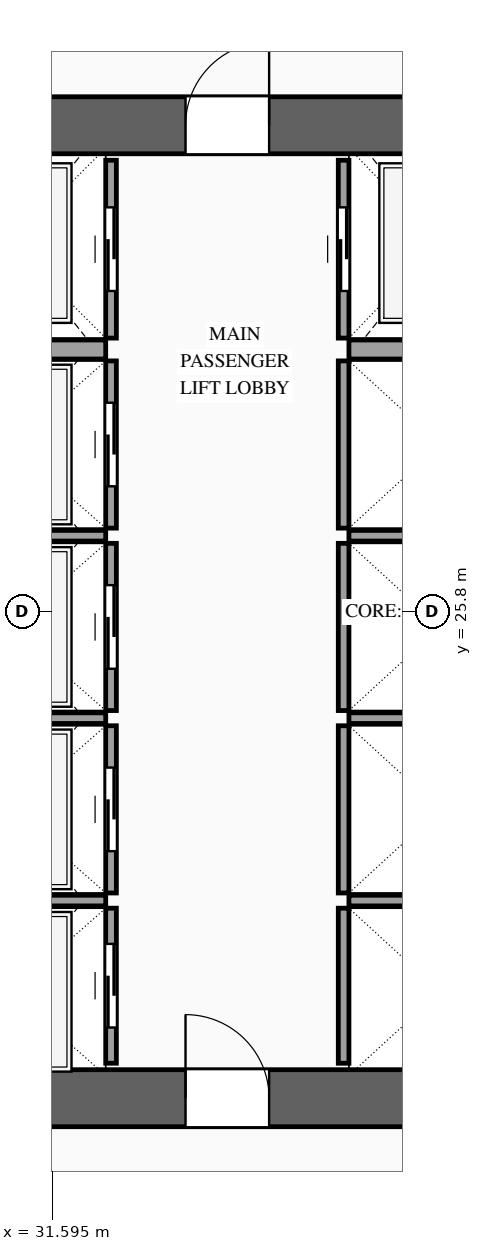
"""IFC4 building model, lengths in metres.
Left out: names, types, materials, properties, quantities, classifications, styles, units other than length and angle.
Written with IfcOpenShell. Run it as: python <this file> out.ifc"""

import sys

from ifc_helpers import new_model, si_unit, direction, frame, frame_2d, origin, place, context, subcontext, project, spatial, rectangle, extrude, source, transform, mapped, element, fill, save


model = new_model("IFC4")
c1 = context("Model", 3, precision=1e-05, world=origin(), true_north=direction((0.0, 1.0)))
c2 = subcontext(c1, "Body", "Model", "MODEL_VIEW")
j1 = project(units=[si_unit("LENGTHUNIT", "METRE"), si_unit("PLANEANGLEUNIT", "RADIAN")], contexts=[c1])
p1 = place(None, origin())
s1 = spatial("IfcSite", under=j1, at=p1, CompositionType="ELEMENT")
p2 = place(p1, origin())
s2 = spatial("IfcBuilding", under=s1, at=p2, CompositionType="ELEMENT")
p3 = place(p2, frame((0.0, 0.0, 138.0)))
s3 = spatial("IfcBuildingStorey", under=s2, at=p3, CompositionType="ELEMENT", Elevation=138.0)
p4 = place(p3, frame((23.425, 19.4, 0.0), z_axis=(0.0, 0.0, 1.0), x_axis=(1.0, 0.0, 0.0)))
e1 = element("IfcWall", 1, at=p4, inside=s3, PredefinedType="SHEAR", context=c2, shape_type="SweptSolid", body=[
    extrude(rectangle(XDim=27.15, YDim=0.75, at=frame_2d((13.575, 0.0))), origin(), (0.0, 0.0, 1.0), 3.6),
])
p5 = place(p4, frame((2.025, 0.0, 0.0)))
e2 = element("IfcOpeningElement", 2, at=p5, cuts=e1, PredefinedType="OPENING", context=c2, shape_type="SweptSolid", body=[
    extrude(rectangle(XDim=1.1, YDim=2.2, at=frame_2d((0.55, 1.1))), frame((0.0, 0.39, 0.0), z_axis=(0.0, -1.0, 0.0), x_axis=(1.0, 0.0, 0.0)), (0.0, 0.0, 1.0), 0.78),
])
p6 = place(p4, frame((9.925, 0.0, 0.0)))
e3 = element("IfcOpeningElement", 3, at=p6, cuts=e1, PredefinedType="OPENING", context=c2, shape_type="SweptSolid", body=[
    extrude(rectangle(XDim=1.1, YDim=2.2, at=frame_2d((0.55, 1.1))), frame((0.0, 0.39, 0.0), z_axis=(0.0, -1.0, 0.0), x_axis=(1.0, 0.0, 0.0)), (0.0, 0.0, 1.0), 0.78),
])
p7 = place(p4, frame((23.125, 0.0, 0.0)))
e4 = element("IfcOpeningElement", 4, at=p7, cuts=e1, PredefinedType="OPENING", context=c2, shape_type="SweptSolid", body=[
    extrude(rectangle(XDim=1.1, YDim=2.2, at=frame_2d((0.55, 1.1))), frame((0.0, 0.39, 0.0), z_axis=(0.0, -1.0, 0.0), x_axis=(1.0, 0.0, 0.0)), (0.0, 0.0, 1.0), 0.78),
])
p8 = place(p4, frame((19.745, 0.0, 0.0)))
e5 = element("IfcOpeningElement", 5, at=p8, cuts=e1, PredefinedType="OPENING", context=c2, shape_type="SweptSolid", body=[
    extrude(rectangle(XDim=0.9, YDim=2.15, at=frame_2d((0.45, 1.075))), frame((0.0, 0.39, 0.0), z_axis=(0.0, -1.0, 0.0), x_axis=(1.0, 0.0, 0.0)), (0.0, 0.0, 1.0), 0.78),
])
p9 = place(p4, frame((18.305, 0.0, 0.0)))
e6 = element("IfcOpeningElement", 6, at=p9, cuts=e1, PredefinedType="OPENING", context=c2, shape_type="SweptSolid", body=[
    extrude(rectangle(XDim=0.9, YDim=2.15, at=frame_2d((0.45, 1.075))), frame((0.0, 0.39, 0.0), z_axis=(0.0, -1.0, 0.0), x_axis=(1.0, 0.0, 0.0)), (0.0, 0.0, 1.0), 0.78),
])
p10 = place(p3, frame((23.425, 32.2, 0.0), z_axis=(0.0, 0.0, 1.0), x_axis=(1.0, 0.0, 0.0)))
e7 = element("IfcWall", 7, at=p10, inside=s3, PredefinedType="SHEAR", context=c2, shape_type="SweptSolid", body=[
    extrude(rectangle(XDim=27.15, YDim=0.75, at=frame_2d((13.575, 0.0))), origin(), (0.0, 0.0, 1.0), 3.6),
])
p11 = place(p10, frame((4.645, 0.0, 0.0)))
e8 = element("IfcOpeningElement", 8, at=p11, cuts=e7, PredefinedType="OPENING", context=c2, shape_type="SweptSolid", body=[
    extrude(rectangle(XDim=0.9, YDim=2.15, at=frame_2d((0.45, 1.075))), frame((0.0, 0.39, 0.0), z_axis=(0.0, -1.0, 0.0), x_axis=(1.0, 0.0, 0.0)), (0.0, 0.0, 1.0), 0.78),
])
p12 = place(p10, frame((9.925, 0.0, 0.0)))
e9 = element("IfcOpeningElement", 9, at=p12, cuts=e7, PredefinedType="OPENING", context=c2, shape_type="SweptSolid", body=[
    extrude(rectangle(XDim=1.1, YDim=2.2, at=frame_2d((0.55, 1.1))), frame((0.0, 0.39, 0.0), z_axis=(0.0, -1.0, 0.0), x_axis=(1.0, 0.0, 0.0)), (0.0, 0.0, 1.0), 0.78),
])
p13 = place(p10, frame((15.775, 0.0, 0.0)))
e10 = element("IfcOpeningElement", 10, at=p13, cuts=e7, PredefinedType="OPENING", context=c2, shape_type="SweptSolid", body=[
    extrude(rectangle(XDim=1.1, YDim=2.2, at=frame_2d((0.55, 1.1))), frame((0.0, 0.39, 0.0), z_axis=(0.0, -1.0, 0.0), x_axis=(1.0, 0.0, 0.0)), (0.0, 0.0, 1.0), 0.78),
])
p14 = place(p10, frame((18.975, 0.0, 0.0)))
e11 = element("IfcOpeningElement", 11, at=p14, cuts=e7, PredefinedType="OPENING", context=c2, shape_type="SweptSolid", body=[
    extrude(rectangle(XDim=0.9, YDim=2.15, at=frame_2d((0.45, 1.075))), frame((0.0, 0.39, 0.0), z_axis=(0.0, -1.0, 0.0), x_axis=(1.0, 0.0, 0.0)), (0.0, 0.0, 1.0), 0.78),
])
p15 = place(p3, frame((32.37, 19.86, 0.0), z_axis=(0.0, 0.0, 1.0), x_axis=(0.0, 1.0, 0.0)))
e12 = element("IfcWall", 12, at=p15, inside=s3, PredefinedType="SOLIDWALL", context=c2, shape_type="SweptSolid", body=[
    extrude(rectangle(XDim=2.04, YDim=0.14, at=frame_2d((1.02, 0.0))), origin(), (0.0, 0.0, 1.0), 3.38),
])
p16 = place(p15, frame((0.47, 0.0, 0.0)))
e13 = element("IfcOpeningElement", 13, at=p16, cuts=e12, PredefinedType="OPENING", context=c2, shape_type="SweptSolid", body=[
    extrude(rectangle(XDim=1.1, YDim=2.2, at=frame_2d((0.55, 1.1))), frame((0.0, 0.085, 0.0), z_axis=(0.0, -1.0, 0.0), x_axis=(1.0, 0.0, 0.0)), (0.0, 0.0, 1.0), 0.17),
])
m1 = source(origin(), c2, "Body", "SweptSolid", [
    extrude(rectangle(XDim=2.5, YDim=0.14, at=frame_2d((1.25, 0.0))), origin(), (0.0, 0.0, 1.0), 3.38),
])
p17 = place(p3, frame((29.8, 22.0, 0.0), z_axis=(0.0, 0.0, 1.0), x_axis=(1.0, 0.0, 0.0)))
e14 = element("IfcWall", 14, at=p17, inside=s3, PredefinedType="SOLIDWALL", context=c2, shape_type="MappedRepresentation", body=[
    mapped(m1, transform((0.0, 0.0, 0.0), scale=1.0)),
])
p18 = place(p3, frame((32.37, 22.1, 0.0), z_axis=(0.0, 0.0, 1.0), x_axis=(0.0, 1.0, 0.0)))
e15 = element("IfcWall", 15, at=p18, inside=s3, PredefinedType="SOLIDWALL", context=c2, shape_type="SweptSolid", body=[
    extrude(rectangle(XDim=2.2, YDim=0.14, at=frame_2d((1.1, 0.0))), origin(), (0.0, 0.0, 1.0), 3.38),
])
p19 = place(p18, frame((0.55, 0.0, 0.0)))
e16 = element("IfcOpeningElement", 16, at=p19, cuts=e15, PredefinedType="OPENING", context=c2, shape_type="SweptSolid", body=[
    extrude(rectangle(XDim=1.1, YDim=2.2, at=frame_2d((0.55, 1.1))), frame((0.0, 0.085, 0.0), z_axis=(0.0, -1.0, 0.0), x_axis=(1.0, 0.0, 0.0)), (0.0, 0.0, 1.0), 0.17),
])
p20 = place(p3, frame((29.8, 24.4, 0.0), z_axis=(0.0, 0.0, 1.0), x_axis=(1.0, 0.0, 0.0)))
e17 = element("IfcWall", 17, at=p20, inside=s3, PredefinedType="SOLIDWALL", context=c2, shape_type="MappedRepresentation", body=[
    mapped(m1, transform((0.0, 0.0, 0.0), scale=1.0)),
])
p21 = place(p3, frame((32.37, 24.5, 0.0), z_axis=(0.0, 0.0, 1.0), x_axis=(0.0, 1.0, 0.0)))
e18 = element("IfcWall", 18, at=p21, inside=s3, PredefinedType="SOLIDWALL", context=c2, shape_type="SweptSolid", body=[
    extrude(rectangle(XDim=2.2, YDim=0.14, at=frame_2d((1.1, 0.0))), origin(), (0.0, 0.0, 1.0), 3.38),
])
p22 = place(p21, frame((0.55, 0.0, 0.0)))
e19 = element("IfcOpeningElement", 19, at=p22, cuts=e18, PredefinedType="OPENING", context=c2, shape_type="SweptSolid", body=[
    extrude(rectangle(XDim=1.1, YDim=2.2, at=frame_2d((0.55, 1.1))), frame((0.0, 0.085, 0.0), z_axis=(0.0, -1.0, 0.0), x_axis=(1.0, 0.0, 0.0)), (0.0, 0.0, 1.0), 0.17),
])
p23 = place(p3, frame((29.8, 26.8, 0.0), z_axis=(0.0, 0.0, 1.0), x_axis=(1.0, 0.0, 0.0)))
e20 = element("IfcWall", 20, at=p23, inside=s3, PredefinedType="SOLIDWALL", context=c2, shape_type="MappedRepresentation", body=[
    mapped(m1, transform((0.0, 0.0, 0.0), scale=1.0)),
])
p24 = place(p3, frame((32.37, 26.9, 0.0), z_axis=(0.0, 0.0, 1.0), x_axis=(0.0, 1.0, 0.0)))
e21 = element("IfcWall", 21, at=p24, inside=s3, PredefinedType="SOLIDWALL", context=c2, shape_type="SweptSolid", body=[
    extrude(rectangle(XDim=2.2, YDim=0.14, at=frame_2d((1.1, 0.0))), origin(), (0.0, 0.0, 1.0), 3.38),
])
p25 = place(p24, frame((0.55, 0.0, 0.0)))
e22 = element("IfcOpeningElement", 22, at=p25, cuts=e21, PredefinedType="OPENING", context=c2, shape_type="SweptSolid", body=[
    extrude(rectangle(XDim=1.1, YDim=2.2, at=frame_2d((0.55, 1.1))), frame((0.0, 0.085, 0.0), z_axis=(0.0, -1.0, 0.0), x_axis=(1.0, 0.0, 0.0)), (0.0, 0.0, 1.0), 0.17),
])
p26 = place(p3, frame((32.37, 29.4, 0.0), z_axis=(0.0, 0.0, 1.0), x_axis=(0.0, 1.0, 0.0)))
e23 = element("IfcWall", 23, at=p26, inside=s3, PredefinedType="SOLIDWALL", context=c2, shape_type="SweptSolid", body=[
    extrude(rectangle(XDim=2.34, YDim=0.14, at=frame_2d((1.17, 0.0))), origin(), (0.0, 0.0, 1.0), 3.38),
])
p27 = place(p26, frame((0.62, 0.0, 0.0)))
e24 = element("IfcOpeningElement", 24, at=p27, cuts=e23, PredefinedType="OPENING", context=c2, shape_type="SweptSolid", body=[
    extrude(rectangle(XDim=1.1, YDim=2.2, at=frame_2d((0.55, 1.1))), frame((0.0, 0.085, 0.0), z_axis=(0.0, -1.0, 0.0), x_axis=(1.0, 0.0, 0.0)), (0.0, 0.0, 1.0), 0.17),
])
m2 = source(origin(), c2, "Body", "SweptSolid", [
    extrude(rectangle(XDim=2.5, YDim=0.25, at=frame_2d((1.25, 0.0))), origin(), (0.0, 0.0, 1.0), 3.38),
])
p28 = place(p3, frame((29.8, 29.25, 0.0), z_axis=(0.0, 0.0, 1.0), x_axis=(1.0, 0.0, 0.0)))
e25 = element("IfcWall", 25, at=p28, inside=s3, PredefinedType="SOLIDWALL", context=c2, shape_type="MappedRepresentation", body=[
    mapped(m2, transform((0.0, 0.0, 0.0), scale=1.0)),
])
m3 = source(origin(), c2, "Body", "SweptSolid", [
    extrude(rectangle(XDim=2.04, YDim=0.14, at=frame_2d((1.02, 0.0))), origin(), (0.0, 0.0, 1.0), 3.38),
])
p29 = place(p3, frame((35.43, 19.86, 0.0), z_axis=(0.0, 0.0, 1.0), x_axis=(0.0, 1.0, 0.0)))
e26 = element("IfcWall", 26, at=p29, inside=s3, PredefinedType="SOLIDWALL", context=c2, shape_type="MappedRepresentation", body=[
    mapped(m3, transform((0.0, 0.0, 0.0), scale=1.0)),
])
m4 = source(origin(), c2, "Body", "SweptSolid", [
    extrude(rectangle(XDim=2.4, YDim=0.14, at=frame_2d((1.2, 0.0))), origin(), (0.0, 0.0, 1.0), 3.38),
])
p30 = place(p3, frame((35.5, 22.0, 0.0), z_axis=(0.0, 0.0, 1.0), x_axis=(1.0, 0.0, 0.0)))
e27 = element("IfcWall", 27, at=p30, inside=s3, PredefinedType="SOLIDWALL", context=c2, shape_type="MappedRepresentation", body=[
    mapped(m4, transform((0.0, 0.0, 0.0), scale=1.0)),
])
m5 = source(origin(), c2, "Body", "SweptSolid", [
    extrude(rectangle(XDim=2.2, YDim=0.14, at=frame_2d((1.1, 0.0))), origin(), (0.0, 0.0, 1.0), 3.38),
])
p31 = place(p3, frame((35.43, 22.1, 0.0), z_axis=(0.0, 0.0, 1.0), x_axis=(0.0, 1.0, 0.0)))
e28 = element("IfcWall", 28, at=p31, inside=s3, PredefinedType="SOLIDWALL", context=c2, shape_type="MappedRepresentation", body=[
    mapped(m5, transform((0.0, 0.0, 0.0), scale=1.0)),
])
p32 = place(p3, frame((35.5, 24.4, 0.0), z_axis=(0.0, 0.0, 1.0), x_axis=(1.0, 0.0, 0.0)))
e29 = element("IfcWall", 29, at=p32, inside=s3, PredefinedType="SOLIDWALL", context=c2, shape_type="MappedRepresentation", body=[
    mapped(m4, transform((0.0, 0.0, 0.0), scale=1.0)),
])
p33 = place(p3, frame((35.43, 24.5, 0.0), z_axis=(0.0, 0.0, 1.0), x_axis=(0.0, 1.0, 0.0)))
e30 = element("IfcWall", 30, at=p33, inside=s3, PredefinedType="SOLIDWALL", context=c2, shape_type="MappedRepresentation", body=[
    mapped(m5, transform((0.0, 0.0, 0.0), scale=1.0)),
])
p34 = place(p3, frame((35.5, 26.8, 0.0), z_axis=(0.0, 0.0, 1.0), x_axis=(1.0, 0.0, 0.0)))
e31 = element("IfcWall", 31, at=p34, inside=s3, PredefinedType="SOLIDWALL", context=c2, shape_type="MappedRepresentation", body=[
    mapped(m4, transform((0.0, 0.0, 0.0), scale=1.0)),
])
m6 = source(origin(), c2, "Body", "SweptSolid", [
    extrude(rectangle(XDim=2.2, YDim=0.14, at=frame_2d((1.1, 0.0))), origin(), (0.0, 0.0, 1.0), 3.38),
])
p35 = place(p3, frame((35.43, 26.9, 0.0), z_axis=(0.0, 0.0, 1.0), x_axis=(0.0, 1.0, 0.0)))
e32 = element("IfcWall", 32, at=p35, inside=s3, PredefinedType="SOLIDWALL", context=c2, shape_type="MappedRepresentation", body=[
    mapped(m6, transform((0.0, 0.0, 0.0), scale=1.0)),
])
p36 = place(p3, frame((35.43, 29.4, 0.0), z_axis=(0.0, 0.0, 1.0), x_axis=(0.0, 1.0, 0.0)))
e33 = element("IfcWall", 33, at=p36, inside=s3, PredefinedType="SOLIDWALL", context=c2, shape_type="SweptSolid", body=[
    extrude(rectangle(XDim=2.34, YDim=0.14, at=frame_2d((1.17, 0.0))), origin(), (0.0, 0.0, 1.0), 3.38),
])
p37 = place(p36, frame((0.62, 0.0, 0.0)))
e34 = element("IfcOpeningElement", 34, at=p37, cuts=e33, PredefinedType="OPENING", context=c2, shape_type="SweptSolid", body=[
    extrude(rectangle(XDim=1.1, YDim=2.2, at=frame_2d((0.55, 1.1))), frame((0.0, 0.085, 0.0), z_axis=(0.0, -1.0, 0.0), x_axis=(1.0, 0.0, 0.0)), (0.0, 0.0, 1.0), 0.17),
])
m7 = source(origin(), c2, "Body", "SweptSolid", [
    extrude(rectangle(XDim=2.4, YDim=0.25, at=frame_2d((1.2, 0.0))), origin(), (0.0, 0.0, 1.0), 3.38),
])
p38 = place(p3, frame((35.5, 29.25, 0.0), z_axis=(0.0, 0.0, 1.0), x_axis=(1.0, 0.0, 0.0)))
e35 = element("IfcWall", 35, at=p38, inside=s3, PredefinedType="SOLIDWALL", context=c2, shape_type="MappedRepresentation", body=[
    mapped(m7, transform((0.0, 0.0, 0.0), scale=1.0)),
])
m8 = source(origin(), c2, "Body", "SweptSolid", [
    extrude(rectangle(XDim=1.1, YDim=2.2, at=frame_2d((0.55, 1.1))), frame((0.0, 0.025, 0.0), z_axis=(0.0, -1.0, 0.0), x_axis=(1.0, 0.0, 0.0)), (0.0, 0.0, 1.0), 0.05),
])
p39 = place(p16, origin())
e36 = element("IfcDoor", 36, at=p39, inside=s3, OperationType="SLIDING_TO_LEFT", PredefinedType="DOOR", context=c2, shape_type="MappedRepresentation", body=[
    mapped(m8, transform((0.0, 0.0, 0.0), scale=1.0)),
])
fill(e13, e36)
p40 = place(p19, origin())
e37 = element("IfcDoor", 37, at=p40, inside=s3, OperationType="SLIDING_TO_RIGHT", PredefinedType="DOOR", context=c2, shape_type="MappedRepresentation", body=[
    mapped(m8, transform((0.0, 0.0, 0.0), scale=1.0)),
])
fill(e16, e37)
p41 = place(p22, origin())
e38 = element("IfcDoor", 38, at=p41, inside=s3, OperationType="SLIDING_TO_LEFT", PredefinedType="DOOR", context=c2, shape_type="MappedRepresentation", body=[
    mapped(m8, transform((0.0, 0.0, 0.0), scale=1.0)),
])
fill(e19, e38)
p42 = place(p25, origin())
e39 = element("IfcDoor", 39, at=p42, inside=s3, OperationType="SLIDING_TO_RIGHT", PredefinedType="DOOR", context=c2, shape_type="MappedRepresentation", body=[
    mapped(m8, transform((0.0, 0.0, 0.0), scale=1.0)),
])
fill(e22, e39)
p43 = place(p27, origin())
e40 = element("IfcDoor", 40, at=p43, inside=s3, OperationType="SLIDING_TO_LEFT", PredefinedType="DOOR", context=c2, shape_type="MappedRepresentation", body=[
    mapped(m8, transform((0.0, 0.0, 0.0), scale=1.0)),
])
fill(e24, e40)
p44 = place(p37, origin())
e41 = element("IfcDoor", 41, at=p44, inside=s3, OperationType="SLIDING_TO_RIGHT", PredefinedType="DOOR", context=c2, shape_type="MappedRepresentation", body=[
    mapped(m8, transform((0.0, 0.0, 0.0), scale=1.0)),
])
fill(e34, e41)
m9 = source(origin(), c2, "Body", "SweptSolid", [
    extrude(rectangle(XDim=1.1, YDim=2.2, at=frame_2d((0.55, 1.1))), frame((0.0, 0.025, 0.0), z_axis=(0.0, -1.0, 0.0), x_axis=(1.0, 0.0, 0.0)), (0.0, 0.0, 1.0), 0.05),
])
p45 = place(p6, origin())
e42 = element("IfcDoor", 42, at=p45, inside=s3, OperationType="SINGLE_SWING_LEFT", PredefinedType="DOOR", context=c2, shape_type="MappedRepresentation", body=[
    mapped(m9, transform((0.0, 0.0, 0.0), scale=1.0)),
])
fill(e3, e42)
p46 = place(p12, origin())
e43 = element("IfcDoor", 43, at=p46, inside=s3, OperationType="SINGLE_SWING_RIGHT", PredefinedType="DOOR", context=c2, shape_type="MappedRepresentation", body=[
    mapped(m9, transform((0.0, 0.0, 0.0), scale=1.0)),
])
fill(e9, e43)
save(model, sys.argv[1])
